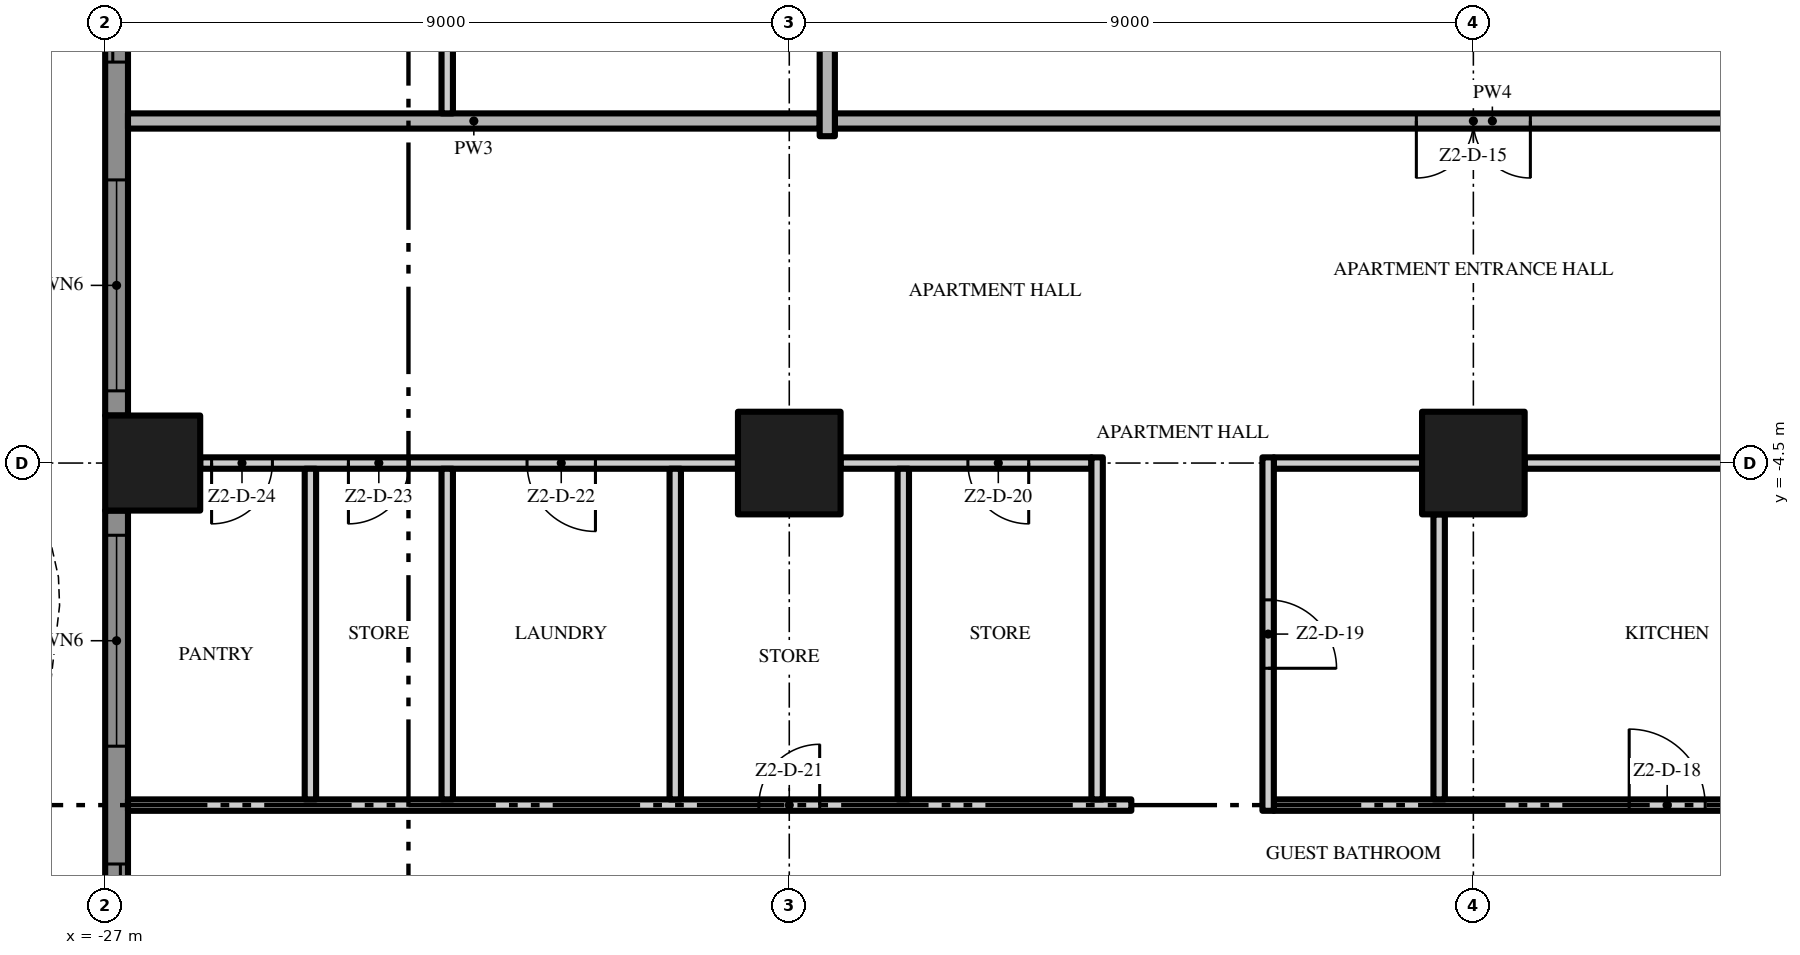
"""IFC4 building model, lengths in metres.
Left out: names, types, materials, properties, quantities, classifications, styles, units other than length and angle.
Written with IfcOpenShell. Run it as: python <this file> out.ifc"""

import sys

from ifc_helpers import new_model, si_unit, direction, frame, frame_2d, origin, origin_2d, place, context, subcontext, project, spatial, polyline, rectangle, outline, extrude, element, fill, save


model = new_model("IFC4")
c1 = context("Model", 3, precision=1e-05, world=origin(), true_north=direction((0.0, 1.0)))
c2 = subcontext(c1, "Body", "Model", "MODEL_VIEW")
j1 = project(units=[si_unit("LENGTHUNIT", "METRE"), si_unit("PLANEANGLEUNIT", "RADIAN")], contexts=[c1])
p1 = place(None, origin())
s1 = spatial("IfcSite", under=j1, at=p1, CompositionType="ELEMENT")
p2 = place(p1, origin())
s2 = spatial("IfcBuilding", under=s1, at=p2, CompositionType="ELEMENT")
p3 = place(p2, frame((0.0, 0.0, 111.2)))
s3 = spatial("IfcBuildingStorey", under=s2, at=p3, CompositionType="ELEMENT", Elevation=111.2)
p4 = place(p3, frame((-18.0, -4.5, 0.0), z_axis=(0.0, 0.0, 1.0), x_axis=(1.0, 0.0, 0.0)))
e1 = element("IfcColumn", 1, at=p4, inside=s3, PredefinedType="COLUMN", context=c2, shape_type="SweptSolid", body=[
    extrude(rectangle(XDim=1.35, YDim=1.35, at=origin_2d()), origin(), (0.0, 0.0, 1.0), 3.5),
])
p5 = place(p3, frame((-26.375, -4.5, 0.0), z_axis=(0.0, 0.0, 1.0), x_axis=(1.0, 0.0, 0.0)))
e2 = element("IfcColumn", 2, at=p5, inside=s3, PredefinedType="COLUMN", context=c2, shape_type="SweptSolid", body=[
    extrude(rectangle(XDim=1.25, YDim=1.25, at=origin_2d()), origin(), (0.0, 0.0, 1.0), 3.5),
])
p6 = place(p3, frame((-9.0, -4.5, 0.0), z_axis=(0.0, 0.0, 1.0), x_axis=(1.0, 0.0, 0.0)))
e3 = element("IfcColumn", 3, at=p6, inside=s3, PredefinedType="COLUMN", context=c2, shape_type="SweptSolid", body=[
    extrude(rectangle(XDim=1.35, YDim=1.35, at=origin_2d()), origin(), (0.0, 0.0, 1.0), 3.5),
])
p7 = place(p3, frame((-26.85, -3.875, 0.0), z_axis=(0.0, 0.0, 1.0), x_axis=(0.0, 1.0, 0.0)))
e4 = element("IfcWall", 4, at=p7, inside=s3, PredefinedType="SOLIDWALL", context=c2, shape_type="SweptSolid", body=[
    extrude(rectangle(XDim=7.75, YDim=0.3, at=frame_2d((3.875, 0.0))), origin(), (0.0, 0.0, 1.0), 3.5),
])
p8 = place(p7, frame((4.65, 0.0, 0.0)))
e5 = element("IfcOpeningElement", 5, at=p8, cuts=e4, PredefinedType="OPENING", context=c2, shape_type="SweptSolid", body=[
    extrude(rectangle(XDim=2.775, YDim=2.4, at=frame_2d((1.387, 1.2))), frame((0.0, 0.16, 0.0), z_axis=(0.0, -1.0, 0.0), x_axis=(1.0, 0.0, 0.0)), (0.0, 0.0, 1.0), 0.32),
])
p9 = place(p7, frame((0.325, 0.0, 0.45)))
e6 = element("IfcOpeningElement", 6, at=p9, cuts=e4, PredefinedType="OPENING", context=c2, shape_type="SweptSolid", body=[
    extrude(rectangle(XDim=2.775, YDim=2.65, at=frame_2d((1.387, 1.325))), frame((0.0, 0.16, 0.0), z_axis=(0.0, -1.0, 0.0), x_axis=(1.0, 0.0, 0.0)), (0.0, 0.0, 1.0), 0.32),
])
p10 = place(p3, frame((-26.85, -12.875, 0.0), z_axis=(0.0, 0.0, 1.0), x_axis=(0.0, 1.0, 0.0)))
e7 = element("IfcWall", 7, at=p10, inside=s3, PredefinedType="SOLIDWALL", context=c2, shape_type="SweptSolid", body=[
    extrude(rectangle(XDim=7.75, YDim=0.3, at=frame_2d((3.875, 0.0))), origin(), (0.0, 0.0, 1.0), 3.5),
])
p11 = place(p10, frame((4.65, 0.0, 0.45)))
e8 = element("IfcOpeningElement", 8, at=p11, cuts=e7, PredefinedType="OPENING", context=c2, shape_type="SweptSolid", body=[
    extrude(rectangle(XDim=2.775, YDim=2.65, at=frame_2d((1.387, 1.325))), frame((0.0, 0.16, 0.0), z_axis=(0.0, -1.0, 0.0), x_axis=(1.0, 0.0, 0.0)), (0.0, 0.0, 1.0), 0.32),
])
p12 = place(p10, frame((0.325, 0.0, 0.0)))
e9 = element("IfcOpeningElement", 9, at=p12, cuts=e7, PredefinedType="OPENING", context=c2, shape_type="SweptSolid", body=[
    extrude(rectangle(XDim=2.775, YDim=2.4, at=frame_2d((1.387, 1.2))), frame((0.0, 0.16, 0.0), z_axis=(0.0, -1.0, 0.0), x_axis=(1.0, 0.0, 0.0)), (0.0, 0.0, 1.0), 0.32),
])
p13 = place(p3, origin())
e10 = element("IfcWall", 10, at=p13, inside=s3, PredefinedType="USERDEFINED", context=c2, shape_type="SweptSolid", body=[
    extrude(outline(polyline([(-29.649, 18.0), (-29.985, 16.5), (-30.0, 16.125), (-29.869, 15.0), (-29.345, 13.5), (-28.612, 12.0), (-27.951, 10.5), (-27.615, 9.0), (-27.6, 8.625), (-27.731, 7.5), (-28.255, 6.0), (-28.988, 4.5), (-29.649, 3.0), (-29.985, 1.5), (-30.0, 1.125), (-29.869, 0.0), (-29.345, -1.5), (-28.612, -3.0), (-27.951, -4.5), (-27.615, -6.0), (-27.6, -6.375), (-27.731, -7.5), (-28.255, -9.0), (-28.988, -10.5), (-29.649, -12.0), (-29.985, -13.5), (-30.0, -13.875), (-29.869, -15.0), (-29.345, -16.5), (-28.612, -18.0), (-28.388, -17.89), (-29.114, -16.404), (-29.624, -14.944), (-29.749, -13.865), (-29.736, -13.533), (-29.41, -12.079), (-28.761, -10.605), (-28.024, -9.096), (-27.486, -7.556), (-27.349, -6.385), (-27.366, -5.967), (-27.713, -4.421), (-28.385, -2.895), (-29.114, -1.404), (-29.624, 0.056), (-29.749, 1.135), (-29.736, 1.467), (-29.41, 2.921), (-28.761, 4.395), (-28.024, 5.904), (-27.486, 7.444), (-27.349, 8.615), (-27.366, 9.033), (-27.713, 10.579), (-28.385, 12.105), (-29.114, 13.596), (-29.624, 15.056), (-29.749, 16.135), (-29.736, 16.467), (-29.405, 17.945), (-29.649, 18.0)])), origin(), (0.0, 0.0, 1.0), 0.9),
])
p14 = place(p3, frame((-26.7, -9.0, 0.0), z_axis=(0.0, 0.0, 1.0), x_axis=(1.0, 0.0, 0.0)))
e11 = element("IfcWall", 11, at=p14, inside=s3, PredefinedType="PARTITIONING", context=c2, shape_type="SweptSolid", body=[
    extrude(rectangle(XDim=13.2, YDim=0.15, at=frame_2d((6.6, 0.0))), origin(), (0.0, 0.0, 1.0), 3.5),
])
p15 = place(p14, frame((8.3, 0.0, 0.0)))
e12 = element("IfcOpeningElement", 12, at=p15, cuts=e11, PredefinedType="OPENING", context=c2, shape_type="SweptSolid", body=[
    extrude(rectangle(XDim=0.8, YDim=2.0, at=frame_2d((0.4, 1.0))), frame((0.0, 0.085, 0.0), z_axis=(0.0, -1.0, 0.0), x_axis=(1.0, 0.0, 0.0)), (0.0, 0.0, 1.0), 0.17),
])
p16 = place(p3, frame((-11.625, -9.0, 0.0), z_axis=(0.0, 0.0, 1.0), x_axis=(1.0, 0.0, 0.0)))
e13 = element("IfcWall", 13, at=p16, inside=s3, PredefinedType="PARTITIONING", context=c2, shape_type="SweptSolid", body=[
    extrude(rectangle(XDim=11.525, YDim=0.15, at=frame_2d((5.763, 0.0))), origin(), (0.0, 0.0, 1.0), 3.5),
])
p17 = place(p16, frame((10.325, 0.0, 0.0)))
e14 = element("IfcOpeningElement", 14, at=p17, cuts=e13, PredefinedType="OPENING", context=c2, shape_type="SweptSolid", body=[
    extrude(rectangle(XDim=0.8, YDim=2.0, at=frame_2d((0.4, 1.0))), frame((0.0, 0.085, 0.0), z_axis=(0.0, -1.0, 0.0), x_axis=(1.0, 0.0, 0.0)), (0.0, 0.0, 1.0), 0.17),
])
p18 = place(p16, frame((4.675, 0.0, 0.0)))
e15 = element("IfcOpeningElement", 15, at=p18, cuts=e13, PredefinedType="OPENING", context=c2, shape_type="SweptSolid", body=[
    extrude(rectangle(XDim=1.0, YDim=2.4, at=frame_2d((0.5, 1.2))), frame((0.0, 0.085, 0.0), z_axis=(0.0, -1.0, 0.0), x_axis=(1.0, 0.0, 0.0)), (0.0, 0.0, 1.0), 0.17),
])
p19 = place(p3, frame((-18.675, -4.5, 0.0), z_axis=(0.0, 0.0, 1.0), x_axis=(-1.0, 0.0, 0.0)))
e16 = element("IfcWall", 16, at=p19, inside=s3, PredefinedType="PARTITIONING", context=c2, shape_type="SweptSolid", body=[
    extrude(rectangle(XDim=7.075, YDim=0.15, at=frame_2d((3.538, 0.0))), origin(), (0.0, 0.0, 1.0), 3.5),
])
p20 = place(p19, frame((1.875, 0.0, 0.0)))
e17 = element("IfcOpeningElement", 17, at=p20, cuts=e16, PredefinedType="OPENING", context=c2, shape_type="SweptSolid", body=[
    extrude(rectangle(XDim=0.9, YDim=2.1, at=frame_2d((0.45, 1.05))), frame((0.0, 0.085, 0.0), z_axis=(0.0, -1.0, 0.0), x_axis=(1.0, 0.0, 0.0)), (0.0, 0.0, 1.0), 0.17),
])
p21 = place(p19, frame((4.325, 0.0, 0.0)))
e18 = element("IfcOpeningElement", 18, at=p21, cuts=e16, PredefinedType="OPENING", context=c2, shape_type="SweptSolid", body=[
    extrude(rectangle(XDim=0.8, YDim=2.0, at=frame_2d((0.4, 1.0))), frame((0.0, 0.085, 0.0), z_axis=(0.0, -1.0, 0.0), x_axis=(1.0, 0.0, 0.0)), (0.0, 0.0, 1.0), 0.17),
])
p22 = place(p19, frame((6.125, 0.0, 0.0)))
e19 = element("IfcOpeningElement", 19, at=p22, cuts=e16, PredefinedType="OPENING", context=c2, shape_type="SweptSolid", body=[
    extrude(rectangle(XDim=0.8, YDim=2.0, at=frame_2d((0.4, 1.0))), frame((0.0, 0.085, 0.0), z_axis=(0.0, -1.0, 0.0), x_axis=(1.0, 0.0, 0.0)), (0.0, 0.0, 1.0), 0.17),
])
p23 = place(p3, frame((-14.025, -4.5, 0.0), z_axis=(0.0, 0.0, 1.0), x_axis=(-1.0, 0.0, 0.0)))
e20 = element("IfcWall", 20, at=p23, inside=s3, PredefinedType="PARTITIONING", context=c2, shape_type="SweptSolid", body=[
    extrude(rectangle(XDim=3.3, YDim=0.15, at=frame_2d((1.65, 0.0))), origin(), (0.0, 0.0, 1.0), 3.5),
])
p24 = place(p23, frame((0.825, 0.0, 0.0)))
e21 = element("IfcOpeningElement", 21, at=p24, cuts=e20, PredefinedType="OPENING", context=c2, shape_type="SweptSolid", body=[
    extrude(rectangle(XDim=0.8, YDim=2.0, at=frame_2d((0.4, 1.0))), frame((0.0, 0.085, 0.0), z_axis=(0.0, -1.0, 0.0), x_axis=(1.0, 0.0, 0.0)), (0.0, 0.0, 1.0), 0.17),
])
p25 = place(p3, frame((-11.625, -4.5, 0.0), z_axis=(0.0, 0.0, 1.0), x_axis=(1.0, 0.0, 0.0)))
e22 = element("IfcWall", 22, at=p25, inside=s3, PredefinedType="PARTITIONING", context=c2, shape_type="SweptSolid", body=[
    extrude(rectangle(XDim=1.95, YDim=0.15, at=frame_2d((0.975, 0.0))), origin(), (0.0, 0.0, 1.0), 3.5),
])
p26 = place(p3, frame((-0.675, -4.5, 0.0), z_axis=(0.0, 0.0, 1.0), x_axis=(-1.0, 0.0, 0.0)))
e23 = element("IfcWall", 23, at=p26, inside=s3, PredefinedType="PARTITIONING", context=c2, shape_type="SweptSolid", body=[
    extrude(rectangle(XDim=7.65, YDim=0.15, at=frame_2d((3.825, 0.0))), origin(), (0.0, 0.0, 1.0), 3.5),
])
p27 = place(p26, frame((1.575, 0.0, 0.0)))
e24 = element("IfcOpeningElement", 24, at=p27, cuts=e23, PredefinedType="OPENING", context=c2, shape_type="SweptSolid", body=[
    extrude(rectangle(XDim=0.8, YDim=2.0, at=frame_2d((0.4, 1.0))), frame((0.0, 0.085, 0.0), z_axis=(0.0, -1.0, 0.0), x_axis=(1.0, 0.0, 0.0)), (0.0, 0.0, 1.0), 0.17),
])
p28 = place(p3, frame((-0.1, 0.0, 0.0), z_axis=(0.0, 0.0, 1.0), x_axis=(-1.0, 0.0, 0.0)))
e25 = element("IfcWall", 25, at=p28, inside=s3, PredefinedType="PARTITIONING", context=c2, shape_type="SweptSolid", body=[
    extrude(rectangle(XDim=17.3, YDim=0.2, at=frame_2d((8.65, 0.0))), origin(), (0.0, 0.0, 1.0), 3.5),
])
p29 = place(p28, frame((8.15, 0.0, 0.0)))
e26 = element("IfcOpeningElement", 26, at=p29, cuts=e25, PredefinedType="OPENING", context=c2, shape_type="SweptSolid", body=[
    extrude(rectangle(XDim=1.5, YDim=2.4, at=frame_2d((0.75, 1.2))), frame((0.0, 0.11, 0.0), z_axis=(0.0, -1.0, 0.0), x_axis=(1.0, 0.0, 0.0)), (0.0, 0.0, 1.0), 0.22),
])
p30 = place(p3, frame((-26.7, 0.0, 0.0), z_axis=(0.0, 0.0, 1.0), x_axis=(1.0, 0.0, 0.0)))
e27 = element("IfcWall", 27, at=p30, inside=s3, PredefinedType="PARTITIONING", context=c2, shape_type="SweptSolid", body=[
    extrude(rectangle(XDim=9.1, YDim=0.2, at=frame_2d((4.55, 0.0))), origin(), (0.0, 0.0, 1.0), 3.5),
])
for number, where, z_axis, x_axis in (
    (28, (-24.3, -8.925, 0.0), (0.0, 0.0, 1.0), (0.0, 1.0, 0.0)),
    (29, (-22.5, -8.925, 0.0), (0.0, 0.0, 1.0), (0.0, 1.0, 0.0)),
):
    element("IfcWall", number, at=place(p3, frame(where, z_axis=z_axis, x_axis=x_axis)), inside=s3, PredefinedType="PARTITIONING", context=c2, shape_type="SweptSolid", body=[
        extrude(rectangle(XDim=4.35, YDim=0.15, at=frame_2d((2.175, 0.0))), origin(), (0.0, 0.0, 1.0), 3.5),
    ])
p31 = place(p3, frame((-22.5, 0.1, 0.0), z_axis=(0.0, 0.0, 1.0), x_axis=(0.0, 1.0, 0.0)))
e30 = element("IfcWall", 30, at=p31, inside=s3, PredefinedType="PARTITIONING", context=c2, shape_type="SweptSolid", body=[
    extrude(rectangle(XDim=17.275, YDim=0.15, at=frame_2d((8.637, 0.0))), origin(), (0.0, 0.0, 1.0), 3.5),
])
p32 = place(p31, frame((1.65, 0.0, 0.0)))
e31 = element("IfcOpeningElement", 31, at=p32, cuts=e30, PredefinedType="OPENING", context=c2, shape_type="SweptSolid", body=[
    extrude(rectangle(XDim=1.0, YDim=2.4, at=frame_2d((0.5, 1.2))), frame((0.0, 0.085, 0.0), z_axis=(0.0, -1.0, 0.0), x_axis=(1.0, 0.0, 0.0)), (0.0, 0.0, 1.0), 0.17),
])
p33 = place(p31, frame((8.0, 0.0, 0.0)))
e32 = element("IfcOpeningElement", 32, at=p33, cuts=e30, PredefinedType="OPENING", context=c2, shape_type="SweptSolid", body=[
    extrude(rectangle(XDim=1.8, YDim=2.4, at=frame_2d((0.9, 1.2))), frame((0.0, 0.085, 0.0), z_axis=(0.0, -1.0, 0.0), x_axis=(1.0, 0.0, 0.0)), (0.0, 0.0, 1.0), 0.17),
])
p34 = place(p3, frame((-19.5, -8.925, 0.0), z_axis=(0.0, 0.0, 1.0), x_axis=(0.0, 1.0, 0.0)))
e33 = element("IfcWall", 33, at=p34, inside=s3, PredefinedType="PARTITIONING", context=c2, shape_type="SweptSolid", body=[
    extrude(rectangle(XDim=4.35, YDim=0.15, at=frame_2d((2.175, 0.0))), origin(), (0.0, 0.0, 1.0), 3.5),
])
p35 = place(p3, frame((-17.5, -0.2, 0.0), z_axis=(0.0, 0.0, 1.0), x_axis=(0.0, 1.0, 0.0)))
e34 = element("IfcWall", 34, at=p35, inside=s3, PredefinedType="PARTITIONING", context=c2, shape_type="SweptSolid", body=[
    extrude(rectangle(XDim=4.025, YDim=0.2, at=frame_2d((2.013, 0.0))), origin(), (0.0, 0.0, 1.0), 3.5),
])
p36 = place(p3, frame((-16.5, -8.925, 0.0), z_axis=(0.0, 0.0, 1.0), x_axis=(0.0, 1.0, 0.0)))
e35 = element("IfcWall", 35, at=p36, inside=s3, PredefinedType="PARTITIONING", context=c2, shape_type="SweptSolid", body=[
    extrude(rectangle(XDim=4.35, YDim=0.15, at=frame_2d((2.175, 0.0))), origin(), (0.0, 0.0, 1.0), 3.5),
])
p37 = place(p3, frame((-13.95, -8.925, 0.0), z_axis=(0.0, 0.0, 1.0), x_axis=(0.0, 1.0, 0.0)))
e36 = element("IfcWall", 36, at=p37, inside=s3, PredefinedType="PARTITIONING", context=c2, shape_type="SweptSolid", body=[
    extrude(rectangle(XDim=4.5, YDim=0.15, at=frame_2d((2.25, 0.0))), origin(), (0.0, 0.0, 1.0), 3.5),
])
p38 = place(p3, frame((-11.7, -4.425, 0.0), z_axis=(0.0, 0.0, 1.0), x_axis=(0.0, -1.0, 0.0)))
e37 = element("IfcWall", 37, at=p38, inside=s3, PredefinedType="PARTITIONING", context=c2, shape_type="SweptSolid", body=[
    extrude(rectangle(XDim=4.65, YDim=0.15, at=frame_2d((2.325, 0.0))), origin(), (0.0, 0.0, 1.0), 3.5),
])
p39 = place(p38, frame((1.875, 0.0, 0.0)))
e38 = element("IfcOpeningElement", 38, at=p39, cuts=e37, PredefinedType="OPENING", context=c2, shape_type="SweptSolid", body=[
    extrude(rectangle(XDim=0.9, YDim=2.1, at=frame_2d((0.45, 1.05))), frame((0.0, 0.085, 0.0), z_axis=(0.0, -1.0, 0.0), x_axis=(1.0, 0.0, 0.0)), (0.0, 0.0, 1.0), 0.17),
])
p40 = place(p3, frame((-9.45, -8.925, 0.0), z_axis=(0.0, 0.0, 1.0), x_axis=(0.0, 1.0, 0.0)))
e39 = element("IfcWall", 39, at=p40, inside=s3, PredefinedType="PARTITIONING", context=c2, shape_type="SweptSolid", body=[
    extrude(rectangle(XDim=3.75, YDim=0.15, at=frame_2d((1.875, 0.0))), origin(), (0.0, 0.0, 1.0), 3.5),
])
p41 = place(p8, origin())
e40 = element("IfcDoor", 40, at=p41, inside=s3, OperationType="SINGLE_SWING_LEFT", PredefinedType="DOOR", context=c2, shape_type="SweptSolid", body=[
    extrude(rectangle(XDim=2.775, YDim=2.4, at=frame_2d((1.387, 1.2))), frame((0.0, 0.025, 0.0), z_axis=(0.0, -1.0, 0.0), x_axis=(1.0, 0.0, 0.0)), (0.0, 0.0, 1.0), 0.05),
])
fill(e5, e40)
p42 = place(p9, origin())
e41 = element("IfcWindow", 41, at=p42, inside=s3, PartitioningType="SINGLE_PANEL", PredefinedType="WINDOW", context=c2, shape_type="SweptSolid", body=[
    extrude(rectangle(XDim=2.775, YDim=2.65, at=frame_2d((1.387, 1.325))), frame((0.0, 0.03, 0.0), z_axis=(0.0, -1.0, 0.0), x_axis=(1.0, 0.0, 0.0)), (0.0, 0.0, 1.0), 0.06),
])
fill(e6, e41)
p43 = place(p11, origin())
e42 = element("IfcWindow", 42, at=p43, inside=s3, PartitioningType="SINGLE_PANEL", PredefinedType="WINDOW", context=c2, shape_type="SweptSolid", body=[
    extrude(rectangle(XDim=2.775, YDim=2.65, at=frame_2d((1.387, 1.325))), frame((0.0, 0.03, 0.0), z_axis=(0.0, -1.0, 0.0), x_axis=(1.0, 0.0, 0.0)), (0.0, 0.0, 1.0), 0.06),
])
fill(e8, e42)
p44 = place(p12, origin())
e43 = element("IfcDoor", 43, at=p44, inside=s3, OperationType="SINGLE_SWING_LEFT", PredefinedType="DOOR", context=c2, shape_type="SweptSolid", body=[
    extrude(rectangle(XDim=2.775, YDim=2.4, at=frame_2d((1.387, 1.2))), frame((0.0, 0.025, 0.0), z_axis=(0.0, -1.0, 0.0), x_axis=(1.0, 0.0, 0.0)), (0.0, 0.0, 1.0), 0.05),
])
fill(e9, e43)
p45 = place(p29, origin())
e44 = element("IfcDoor", 44, at=p45, inside=s3, OperationType="DOUBLE_DOOR_SINGLE_SWING", PredefinedType="DOOR", context=c2, shape_type="SweptSolid", body=[
    extrude(rectangle(XDim=1.5, YDim=2.4, at=frame_2d((0.75, 1.2))), frame((0.0, 0.025, 0.0), z_axis=(0.0, -1.0, 0.0), x_axis=(1.0, 0.0, 0.0)), (0.0, 0.0, 1.0), 0.05),
])
fill(e26, e44)
p46 = place(p18, origin())
e45 = element("IfcDoor", 45, at=p46, inside=s3, OperationType="SINGLE_SWING_LEFT", PredefinedType="DOOR", context=c2, shape_type="SweptSolid", body=[
    extrude(rectangle(XDim=1.0, YDim=2.4, at=frame_2d((0.5, 1.2))), frame((0.0, 0.025, 0.0), z_axis=(0.0, -1.0, 0.0), x_axis=(1.0, 0.0, 0.0)), (0.0, 0.0, 1.0), 0.05),
])
fill(e15, e45)
p47 = place(p39, origin())
e46 = element("IfcDoor", 46, at=p47, inside=s3, OperationType="SINGLE_SWING_RIGHT", PredefinedType="DOOR", context=c2, shape_type="SweptSolid", body=[
    extrude(rectangle(XDim=0.9, YDim=2.1, at=frame_2d((0.45, 1.05))), frame((0.0, 0.025, 0.0), z_axis=(0.0, -1.0, 0.0), x_axis=(1.0, 0.0, 0.0)), (0.0, 0.0, 1.0), 0.05),
])
fill(e38, e46)
p48 = place(p24, origin())
e47 = element("IfcDoor", 47, at=p48, inside=s3, OperationType="SINGLE_SWING_LEFT", PredefinedType="DOOR", context=c2, shape_type="SweptSolid", body=[
    extrude(rectangle(XDim=0.8, YDim=2.0, at=frame_2d((0.4, 1.0))), frame((0.0, 0.025, 0.0), z_axis=(0.0, -1.0, 0.0), x_axis=(1.0, 0.0, 0.0)), (0.0, 0.0, 1.0), 0.05),
])
fill(e21, e47)
p49 = place(p15, origin())
e48 = element("IfcDoor", 48, at=p49, inside=s3, OperationType="SINGLE_SWING_RIGHT", PredefinedType="DOOR", context=c2, shape_type="SweptSolid", body=[
    extrude(rectangle(XDim=0.8, YDim=2.0, at=frame_2d((0.4, 1.0))), frame((0.0, 0.025, 0.0), z_axis=(0.0, -1.0, 0.0), x_axis=(1.0, 0.0, 0.0)), (0.0, 0.0, 1.0), 0.05),
])
fill(e12, e48)
p50 = place(p20, origin())
e49 = element("IfcDoor", 49, at=p50, inside=s3, OperationType="SINGLE_SWING_LEFT", PredefinedType="DOOR", context=c2, shape_type="SweptSolid", body=[
    extrude(rectangle(XDim=0.9, YDim=2.1, at=frame_2d((0.45, 1.05))), frame((0.0, 0.025, 0.0), z_axis=(0.0, -1.0, 0.0), x_axis=(1.0, 0.0, 0.0)), (0.0, 0.0, 1.0), 0.05),
])
fill(e17, e49)
p51 = place(p21, origin())
e50 = element("IfcDoor", 50, at=p51, inside=s3, OperationType="SINGLE_SWING_RIGHT", PredefinedType="DOOR", context=c2, shape_type="SweptSolid", body=[
    extrude(rectangle(XDim=0.8, YDim=2.0, at=frame_2d((0.4, 1.0))), frame((0.0, 0.025, 0.0), z_axis=(0.0, -1.0, 0.0), x_axis=(1.0, 0.0, 0.0)), (0.0, 0.0, 1.0), 0.05),
])
fill(e18, e50)
p52 = place(p22, origin())
e51 = element("IfcDoor", 51, at=p52, inside=s3, OperationType="SINGLE_SWING_RIGHT", PredefinedType="DOOR", context=c2, shape_type="SweptSolid", body=[
    extrude(rectangle(XDim=0.8, YDim=2.0, at=frame_2d((0.4, 1.0))), frame((0.0, 0.025, 0.0), z_axis=(0.0, -1.0, 0.0), x_axis=(1.0, 0.0, 0.0)), (0.0, 0.0, 1.0), 0.05),
])
fill(e19, e51)
save(model, sys.argv[1])
